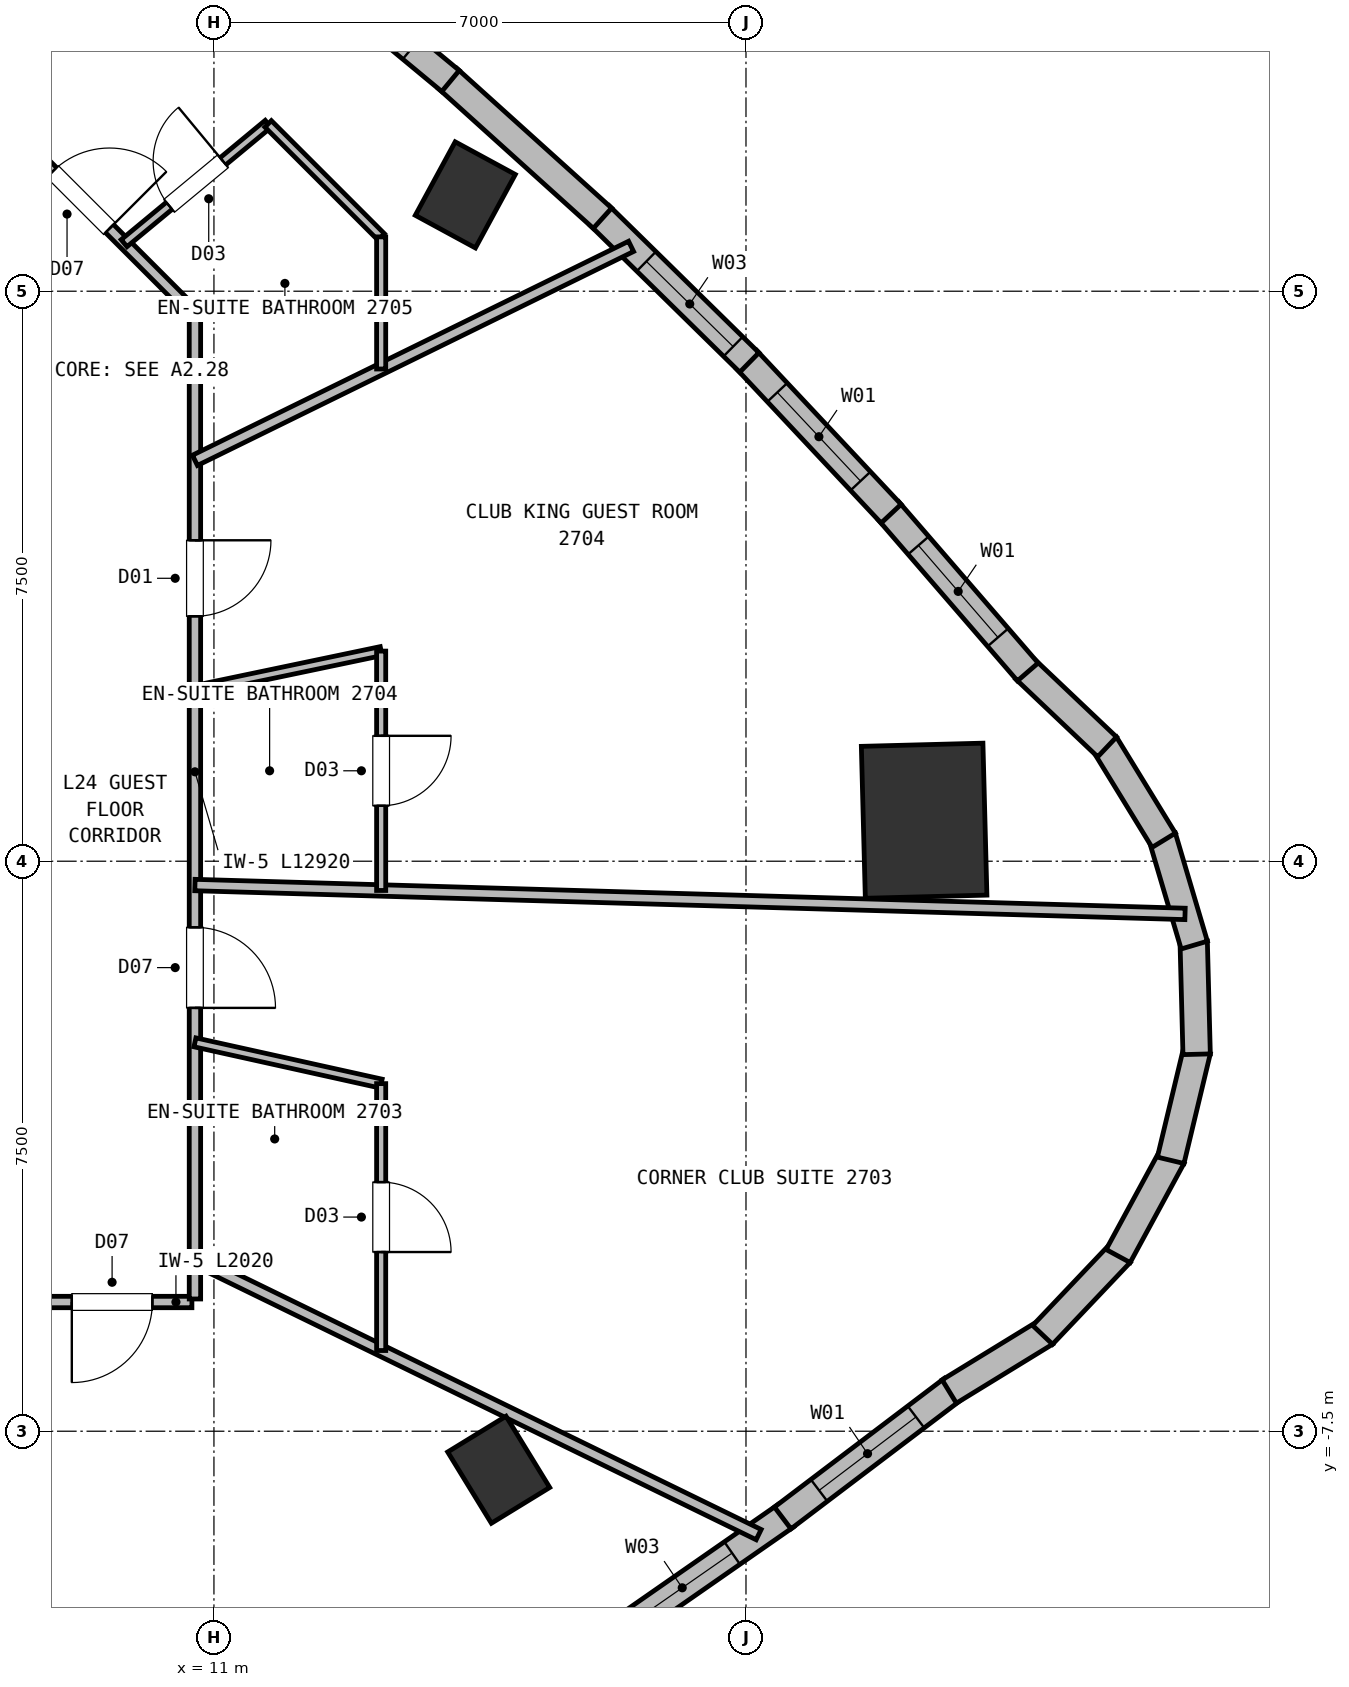
"""IFC4 building model, lengths in metres.
Left out: names, types, materials, properties, quantities, classifications, styles, units other than length and angle.
Written with IfcOpenShell. Run it as: python <this file> out.ifc"""

import sys

from ifc_helpers import new_model, si_unit, direction, frame, frame_2d, origin, origin_2d, place, context, subcontext, project, spatial, rectangle, extrude, element, fill, save


model = new_model("IFC4")
c1 = context("Model", 3, precision=1e-05, world=origin(), true_north=direction((0.0, 1.0)))
c2 = subcontext(c1, "Body", "Model", "MODEL_VIEW")
j1 = project(units=[si_unit("LENGTHUNIT", "METRE"), si_unit("PLANEANGLEUNIT", "RADIAN")], contexts=[c1])
p1 = place(None, origin())
s1 = spatial("IfcSite", under=j1, at=p1, CompositionType="ELEMENT")
p2 = place(p1, origin())
s2 = spatial("IfcBuilding", under=s1, at=p2, CompositionType="ELEMENT")
p3 = place(p2, frame((0.0, 0.0, 101.0)))
s3 = spatial("IfcBuildingStorey", under=s2, at=p3, CompositionType="ELEMENT", Elevation=101.0)
p4 = place(p3, frame((14.747, -8.007, 0.0), z_axis=(0.0, 0.0, 1.0), x_axis=(0.852640164354, 0.522498564716, 0.0)))
e1 = element("IfcColumn", 1, at=p4, inside=s3, PredefinedType="COLUMN", context=c2, shape_type="SweptSolid", body=[
    extrude(rectangle(XDim=0.9, YDim=1.1, at=origin_2d()), origin(), (0.0, 0.0, 1.0), 3.75),
])
p5 = place(p3, frame((20.344, 0.533, 0.0), z_axis=(0.0, 0.0, 1.0), x_axis=(0.999657324976, 0.026176948308, 0.0)))
e2 = element("IfcColumn", 2, at=p5, inside=s3, PredefinedType="COLUMN", context=c2, shape_type="SweptSolid", body=[
    extrude(rectangle(XDim=1.6, YDim=2.0, at=origin_2d()), origin(), (0.0, 0.0, 1.0), 3.75),
])
p6 = place(p3, frame((14.307, 8.767, 0.0), z_axis=(0.0, 0.0, 1.0), x_axis=(-0.878817112662, 0.47715876026, 0.0)))
e3 = element("IfcColumn", 3, at=p6, inside=s3, PredefinedType="COLUMN", context=c2, shape_type="SweptSolid", body=[
    extrude(rectangle(XDim=0.9, YDim=1.1, at=origin_2d()), origin(), (0.0, 0.0, 1.0), 3.75),
])
p7 = place(p3, frame((18.524, -8.612, 0.0), z_axis=(0.0, 0.0, 1.0), x_axis=(-0.820851453433, -0.5711417437, 0.0)))
e4 = element("IfcWall", 4, at=p7, inside=s3, PredefinedType="SOLIDWALL", context=c2, shape_type="SweptSolid", body=[
    extrude(rectangle(XDim=2.778, YDim=0.36, at=frame_2d((1.389, 0.0))), origin(), (0.0, 0.0, 1.0), 3.5),
])
p8 = place(p7, frame((0.86, 0.0, 0.72)))
e5 = element("IfcOpeningElement", 5, at=p8, cuts=e4, PredefinedType="OPENING", context=c2, shape_type="SweptSolid", body=[
    extrude(rectangle(XDim=1.6, YDim=1.88, at=frame_2d((0.8, 0.94))), frame((0.0, 0.19, 0.0), z_axis=(0.0, -1.0, 0.0), x_axis=(1.0, 0.0, 0.0)), (0.0, 0.0, 1.0), 0.38),
])
p9 = place(p3, frame((20.716, -6.949, 0.0), z_axis=(0.0, 0.0, 1.0), x_axis=(-0.796935762967, -0.604064060928, 0.0)))
e6 = element("IfcWall", 6, at=p9, inside=s3, PredefinedType="SOLIDWALL", context=c2, shape_type="SweptSolid", body=[
    extrude(rectangle(XDim=2.801, YDim=0.36, at=frame_2d((1.401, 0.0))), origin(), (0.0, 0.0, 1.0), 3.5),
])
p10 = place(p9, frame((0.601, 0.0, 0.72)))
e7 = element("IfcOpeningElement", 7, at=p10, cuts=e6, PredefinedType="OPENING", context=c2, shape_type="SweptSolid", body=[
    extrude(rectangle(XDim=1.6, YDim=1.88, at=frame_2d((0.8, 0.94))), frame((0.0, 0.19, 0.0), z_axis=(0.0, -1.0, 0.0), x_axis=(1.0, 0.0, 0.0)), (0.0, 0.0, 1.0), 0.38),
])
for number, where, z_axis, x_axis in (
    (8, (21.941, -6.201, 0.0), (0.0, 0.0, 1.0), (-0.853, -0.523, 0.0)),
    (9, (22.926, -5.155, 0.0), (0.0, 0.0, 1.0), (-0.688, -0.725, 0.0)),
):
    element("IfcWall", number, at=place(p3, frame(where, z_axis=z_axis, x_axis=x_axis)), inside=s3, PredefinedType="SOLIDWALL", context=c2, shape_type="SweptSolid", body=[
        extrude(rectangle(XDim=1.486, YDim=0.36, at=frame_2d((0.743, 0.0))), origin(), (0.0, 0.0, 1.0), 3.5),
    ])
for number, where, z_axis, x_axis in (
    (10, (23.605, -3.889, 0.0), (0.0, 0.0, 1.0), (-0.477, -0.879, 0.0)),
    (11, (23.934, -2.491, 0.0), (0.0, 0.0, 1.0), (-0.233, -0.972, 0.0)),
):
    element("IfcWall", number, at=place(p3, frame(where, z_axis=z_axis, x_axis=x_axis)), inside=s3, PredefinedType="SOLIDWALL", context=c2, shape_type="SweptSolid", body=[
        extrude(rectangle(XDim=1.486, YDim=0.36, at=frame_2d((0.743, 0.0))), origin(), (0.0, 0.0, 1.0), 3.5),
    ])
for number, where, z_axis, x_axis in (
    (12, (23.89, -1.055, 0.0), (0.0, 0.0, 1.0), (0.026, -1.0, 0.0)),
    (13, (23.476, 0.321, 0.0), (0.0, 0.0, 1.0), (0.284, -0.959, 0.0)),
    (14, (22.72, 1.542, 0.0), (0.0, 0.0, 1.0), (0.523, -0.853, 0.0)),
    (15, (21.673, 2.527, 0.0), (0.0, 0.0, 1.0), (0.725, -0.688, 0.0)),
):
    element("IfcWall", number, at=place(p3, frame(where, z_axis=z_axis, x_axis=x_axis)), inside=s3, PredefinedType="SOLIDWALL", context=c2, shape_type="SweptSolid", body=[
        extrude(rectangle(XDim=1.486, YDim=0.36, at=frame_2d((0.743, 0.0))), origin(), (0.0, 0.0, 1.0), 3.5),
    ])
p11 = place(p3, frame((19.876, 4.61, 0.0), z_axis=(0.0, 0.0, 1.0), x_axis=(0.653907994708, -0.75657407731, 0.0)))
e16 = element("IfcWall", 16, at=p11, inside=s3, PredefinedType="SOLIDWALL", context=c2, shape_type="SweptSolid", body=[
    extrude(rectangle(XDim=2.801, YDim=0.36, at=frame_2d((1.401, 0.0))), origin(), (0.0, 0.0, 1.0), 3.5),
])
p12 = place(p11, frame((0.601, 0.0, 0.72)))
e17 = element("IfcOpeningElement", 17, at=p12, cuts=e16, PredefinedType="OPENING", context=c2, shape_type="SweptSolid", body=[
    extrude(rectangle(XDim=1.6, YDim=1.88, at=frame_2d((0.8, 0.94))), frame((0.0, 0.19, 0.0), z_axis=(0.0, -1.0, 0.0), x_axis=(1.0, 0.0, 0.0)), (0.0, 0.0, 1.0), 0.38),
])
p13 = place(p3, frame((18.009, 6.598, 0.0), z_axis=(0.0, 0.0, 1.0), x_axis=(0.68415455393, -0.729337059484, 0.0)))
e18 = element("IfcWall", 18, at=p13, inside=s3, PredefinedType="SOLIDWALL", context=c2, shape_type="SweptSolid", body=[
    extrude(rectangle(XDim=2.777, YDim=0.36, at=frame_2d((1.389, 0.0))), origin(), (0.0, 0.0, 1.0), 3.5),
])
p14 = place(p13, frame((0.589, 0.0, 0.72)))
e19 = element("IfcOpeningElement", 19, at=p14, cuts=e18, PredefinedType="OPENING", context=c2, shape_type="SweptSolid", body=[
    extrude(rectangle(XDim=1.6, YDim=1.88, at=frame_2d((0.8, 0.94))), frame((0.0, 0.19, 0.0), z_axis=(0.0, -1.0, 0.0), x_axis=(1.0, 0.0, 0.0)), (0.0, 0.0, 1.0), 0.38),
])
p15 = place(p3, frame((16.075, 8.495, 0.0), z_axis=(0.0, 0.0, 1.0), x_axis=(0.713713584755, -0.70043766242, 0.0)))
e20 = element("IfcWall", 20, at=p15, inside=s3, PredefinedType="SOLIDWALL", context=c2, shape_type="SweptSolid", body=[
    extrude(rectangle(XDim=2.759, YDim=0.36, at=frame_2d((1.379, 0.0))), origin(), (0.0, 0.0, 1.0), 3.5),
])
p16 = place(p15, frame((0.86, 0.0, 0.72)))
e21 = element("IfcOpeningElement", 21, at=p16, cuts=e20, PredefinedType="OPENING", context=c2, shape_type="SweptSolid", body=[
    extrude(rectangle(XDim=1.6, YDim=1.88, at=frame_2d((0.8, 0.94))), frame((0.0, 0.19, 0.0), z_axis=(0.0, -1.0, 0.0), x_axis=(1.0, 0.0, 0.0)), (0.0, 0.0, 1.0), 0.38),
])
p17 = place(p3, frame((14.075, 10.299, 0.0), z_axis=(0.0, 0.0, 1.0), x_axis=(0.742346706701, -0.67001594537, 0.0)))
e22 = element("IfcWall", 22, at=p17, inside=s3, PredefinedType="SOLIDWALL", context=c2, shape_type="SweptSolid", body=[
    extrude(rectangle(XDim=2.744, YDim=0.36, at=frame_2d((1.372, 0.0))), origin(), (0.0, 0.0, 1.0), 3.5),
])
p18 = place(p3, frame((12.007, 12.011, 0.0), z_axis=(0.0, 0.0, 1.0), x_axis=(0.769960149578, -0.63809197461, 0.0)))
e23 = element("IfcWall", 23, at=p18, inside=s3, PredefinedType="SOLIDWALL", context=c2, shape_type="SweptSolid", body=[
    extrude(rectangle(XDim=2.735, YDim=0.36, at=frame_2d((1.367, 0.0))), origin(), (0.0, 0.0, 1.0), 3.5),
])
p19 = place(p18, frame((0.667, 0.0, 0.72)))
e24 = element("IfcOpeningElement", 24, at=p19, cuts=e23, PredefinedType="OPENING", context=c2, shape_type="SweptSolid", body=[
    extrude(rectangle(XDim=1.4, YDim=1.84, at=frame_2d((0.7, 0.92))), frame((0.0, 0.19, 0.0), z_axis=(0.0, -1.0, 0.0), x_axis=(1.0, 0.0, 0.0)), (0.0, 0.0, 1.0), 0.38),
])
p20 = place(p3, frame((10.71, -5.8, 0.0), z_axis=(0.0, 0.0, 1.0), x_axis=(-1.0, 0.0, 0.0)))
e25 = element("IfcWall", 25, at=p20, inside=s3, PredefinedType="PARTITIONING", context=c2, shape_type="SweptSolid", body=[
    extrude(rectangle(XDim=2.02, YDim=0.15, at=frame_2d((1.01, 0.0))), origin(), (0.0, 0.0, 1.0), 3.5),
])
p21 = place(p20, frame((0.52, 0.0, 0.0)))
e26 = element("IfcOpeningElement", 26, at=p21, cuts=e25, PredefinedType="OPENING", context=c2, shape_type="SweptSolid", body=[
    extrude(rectangle(XDim=1.06, YDim=2.15, at=frame_2d((0.53, 1.075))), frame((0.0, 0.085, 0.0), z_axis=(0.0, -1.0, 0.0), x_axis=(1.0, 0.0, 0.0)), (0.0, 0.0, 1.0), 0.17),
])
p22 = place(p3, frame((10.75, 7.16, 0.0), z_axis=(0.0, 0.0, 1.0), x_axis=(0.0, -1.0, 0.0)))
e27 = element("IfcWall", 27, at=p22, inside=s3, PredefinedType="PARTITIONING", context=c2, shape_type="SweptSolid", body=[
    extrude(rectangle(XDim=12.92, YDim=0.15, at=frame_2d((6.46, 0.0))), origin(), (0.0, 0.0, 1.0), 3.5),
])
p23 = place(p22, frame((2.937, 0.0, 0.0)))
e28 = element("IfcOpeningElement", 28, at=p23, cuts=e27, PredefinedType="OPENING", context=c2, shape_type="SweptSolid", body=[
    extrude(rectangle(XDim=1.0, YDim=2.15, at=frame_2d((0.5, 1.075))), frame((0.0, 0.085, 0.0), z_axis=(0.0, -1.0, 0.0), x_axis=(1.0, 0.0, 0.0)), (0.0, 0.0, 1.0), 0.17),
])
p24 = place(p22, frame((8.03, 0.0, 0.0)))
e29 = element("IfcOpeningElement", 29, at=p24, cuts=e27, PredefinedType="OPENING", context=c2, shape_type="SweptSolid", body=[
    extrude(rectangle(XDim=1.06, YDim=2.15, at=frame_2d((0.53, 1.075))), frame((0.0, 0.085, 0.0), z_axis=(0.0, -1.0, 0.0), x_axis=(1.0, 0.0, 0.0)), (0.0, 0.0, 1.0), 0.17),
])
p25 = place(p3, frame((8.678, 9.272, 0.0), z_axis=(0.0, 0.0, 1.0), x_axis=(0.707106781187, -0.707106781187, 0.0)))
e30 = element("IfcWall", 30, at=p25, inside=s3, PredefinedType="PARTITIONING", context=c2, shape_type="SweptSolid", body=[
    extrude(rectangle(XDim=2.89, YDim=0.15, at=frame_2d((1.445, 0.0))), origin(), (0.0, 0.0, 1.0), 3.5),
])
p26 = place(p25, frame((0.28, 0.0, 0.0)))
e31 = element("IfcOpeningElement", 31, at=p26, cuts=e30, PredefinedType="OPENING", context=c2, shape_type="SweptSolid", body=[
    extrude(rectangle(XDim=1.06, YDim=2.15, at=frame_2d((0.53, 1.075))), frame((0.0, 0.085, 0.0), z_axis=(0.0, -1.0, 0.0), x_axis=(1.0, 0.0, 0.0)), (0.0, 0.0, 1.0), 0.17),
])
p27 = place(p3, frame((10.75, -5.243, 0.0), z_axis=(0.0, 0.0, 1.0), x_axis=(0.898792044872, -0.4383752503, 0.0)))
e32 = element("IfcWall", 32, at=p27, inside=s3, PredefinedType="PARTITIONING", context=c2, shape_type="SweptSolid", body=[
    extrude(rectangle(XDim=8.252, YDim=0.15, at=frame_2d((4.126, 0.0))), origin(), (0.0, 0.0, 1.0), 3.5),
])
p28 = place(p3, frame((10.75, -2.383, 0.0), z_axis=(0.0, 0.0, 1.0), x_axis=(0.976289961462, -0.216466882337, 0.0)))
e33 = element("IfcWall", 33, at=p28, inside=s3, PredefinedType="PARTITIONING", context=c2, shape_type="SweptSolid", body=[
    extrude(rectangle(XDim=2.51, YDim=0.12, at=frame_2d((1.255, 0.0))), origin(), (0.0, 0.0, 1.0), 3.5),
])
p29 = place(p3, frame((13.2, -2.927, 0.0), z_axis=(0.0, 0.0, 1.0), x_axis=(0.0, -1.0, 0.0)))
e34 = element("IfcWall", 34, at=p29, inside=s3, PredefinedType="PARTITIONING", context=c2, shape_type="SweptSolid", body=[
    extrude(rectangle(XDim=3.511, YDim=0.12, at=frame_2d((1.756, 0.0))), origin(), (0.0, 0.0, 1.0), 3.5),
])
p30 = place(p29, frame((1.296, 0.0, 0.0)))
e35 = element("IfcOpeningElement", 35, at=p30, cuts=e34, PredefinedType="OPENING", context=c2, shape_type="SweptSolid", body=[
    extrude(rectangle(XDim=0.92, YDim=2.1, at=frame_2d((0.46, 1.05))), frame((0.0, 0.07, 0.0), z_axis=(0.0, -1.0, 0.0), x_axis=(1.0, 0.0, 0.0)), (0.0, 0.0, 1.0), 0.14),
])
p31 = place(p3, frame((10.75, -0.313, 0.0), z_axis=(0.0, 0.0, 1.0), x_axis=(0.999575058165, -0.029149667157, 0.0)))
e36 = element("IfcWall", 36, at=p31, inside=s3, PredefinedType="PARTITIONING", context=c2, shape_type="SweptSolid", body=[
    extrude(rectangle(XDim=13.032, YDim=0.15, at=frame_2d((6.516, 0.0))), origin(), (0.0, 0.0, 1.0), 3.5),
])
p32 = place(p3, frame((13.2, 2.765, 0.0), z_axis=(0.0, 0.0, 1.0), x_axis=(-0.978777888037, -0.204924000276, 0.0)))
e37 = element("IfcWall", 37, at=p32, inside=s3, PredefinedType="PARTITIONING", context=c2, shape_type="SweptSolid", body=[
    extrude(rectangle(XDim=2.503, YDim=0.12, at=frame_2d((1.251, 0.0))), origin(), (0.0, 0.0, 1.0), 3.5),
])
p33 = place(p3, frame((13.2, 2.765, 0.0), z_axis=(0.0, 0.0, 1.0), x_axis=(0.0, -1.0, 0.0)))
e38 = element("IfcWall", 38, at=p33, inside=s3, PredefinedType="PARTITIONING", context=c2, shape_type="SweptSolid", body=[
    extrude(rectangle(XDim=3.15, YDim=0.12, at=frame_2d((1.575, 0.0))), origin(), (0.0, 0.0, 1.0), 3.5),
])
p34 = place(p33, frame((1.115, 0.0, 0.0)))
e39 = element("IfcOpeningElement", 39, at=p34, cuts=e38, PredefinedType="OPENING", context=c2, shape_type="SweptSolid", body=[
    extrude(rectangle(XDim=0.92, YDim=2.1, at=frame_2d((0.46, 1.05))), frame((0.0, 0.07, 0.0), z_axis=(0.0, -1.0, 0.0), x_axis=(1.0, 0.0, 0.0)), (0.0, 0.0, 1.0), 0.14),
])
p35 = place(p3, frame((10.75, 5.274, 0.0), z_axis=(0.0, 0.0, 1.0), x_axis=(0.897755780575, 0.440493539616, 0.0)))
e40 = element("IfcWall", 40, at=p35, inside=s3, PredefinedType="PARTITIONING", context=c2, shape_type="SweptSolid", body=[
    extrude(rectangle(XDim=6.392, YDim=0.15, at=frame_2d((3.196, 0.0))), origin(), (0.0, 0.0, 1.0), 3.5),
])
p36 = place(p3, frame((9.818, 8.132, 0.0), z_axis=(0.0, 0.0, 1.0), x_axis=(0.770088402747, 0.63793718496, 0.0)))
e41 = element("IfcWall", 41, at=p36, inside=s3, PredefinedType="PARTITIONING", context=c2, shape_type="SweptSolid", body=[
    extrude(rectangle(XDim=2.461, YDim=0.12, at=frame_2d((1.23, 0.0))), origin(), (0.0, 0.0, 1.0), 3.5),
])
p37 = place(p36, frame((0.771, 0.0, 0.0)))
e42 = element("IfcOpeningElement", 42, at=p37, cuts=e41, PredefinedType="OPENING", context=c2, shape_type="SweptSolid", body=[
    extrude(rectangle(XDim=0.92, YDim=2.1, at=frame_2d((0.46, 1.05))), frame((0.0, 0.07, 0.0), z_axis=(0.0, -1.0, 0.0), x_axis=(1.0, 0.0, 0.0)), (0.0, 0.0, 1.0), 0.14),
])
p38 = place(p3, frame((11.713, 9.702, 0.0), z_axis=(0.0, 0.0, 1.0), x_axis=(0.707106781187, -0.707106781187, 0.0)))
e43 = element("IfcWall", 43, at=p38, inside=s3, PredefinedType="PARTITIONING", context=c2, shape_type="SweptSolid", body=[
    extrude(rectangle(XDim=2.103, YDim=0.12, at=frame_2d((1.052, 0.0))), origin(), (0.0, 0.0, 1.0), 3.5),
])
p39 = place(p3, frame((13.2, 6.477, 0.0), z_axis=(0.0, 0.0, 1.0), x_axis=(0.0, 1.0, 0.0)))
e44 = element("IfcWall", 44, at=p39, inside=s3, PredefinedType="PARTITIONING", context=c2, shape_type="SweptSolid", body=[
    extrude(rectangle(XDim=1.738, YDim=0.12, at=frame_2d((0.869, 0.0))), origin(), (0.0, 0.0, 1.0), 3.5),
])
p40 = place(p3, frame((7.04, 9.3, 0.0), z_axis=(0.0, 0.0, 1.0), x_axis=(0.603580834167, 0.797301810249, 0.0)))
e45 = element("IfcWall", 45, at=p40, inside=s3, PredefinedType="PARTITIONING", context=c2, shape_type="SweptSolid", body=[
    extrude(rectangle(XDim=5.162, YDim=0.15, at=frame_2d((2.581, 0.0))), origin(), (0.0, 0.0, 1.0), 3.5),
])
p41 = place(p8, origin())
e46 = element("IfcWindow", 46, at=p41, inside=s3, PartitioningType="SINGLE_PANEL", PredefinedType="WINDOW", context=c2, shape_type="SweptSolid", body=[
    extrude(rectangle(XDim=1.6, YDim=1.88, at=frame_2d((0.8, 0.94))), frame((0.0, 0.03, 0.0), z_axis=(0.0, -1.0, 0.0), x_axis=(1.0, 0.0, 0.0)), (0.0, 0.0, 1.0), 0.06),
])
fill(e5, e46)
p42 = place(p10, origin())
e47 = element("IfcWindow", 47, at=p42, inside=s3, PartitioningType="SINGLE_PANEL", PredefinedType="WINDOW", context=c2, shape_type="SweptSolid", body=[
    extrude(rectangle(XDim=1.6, YDim=1.88, at=frame_2d((0.8, 0.94))), frame((0.0, 0.03, 0.0), z_axis=(0.0, -1.0, 0.0), x_axis=(1.0, 0.0, 0.0)), (0.0, 0.0, 1.0), 0.06),
])
fill(e7, e47)
p43 = place(p12, origin())
e48 = element("IfcWindow", 48, at=p43, inside=s3, PartitioningType="SINGLE_PANEL", PredefinedType="WINDOW", context=c2, shape_type="SweptSolid", body=[
    extrude(rectangle(XDim=1.6, YDim=1.88, at=frame_2d((0.8, 0.94))), frame((0.0, 0.03, 0.0), z_axis=(0.0, -1.0, 0.0), x_axis=(1.0, 0.0, 0.0)), (0.0, 0.0, 1.0), 0.06),
])
fill(e17, e48)
p44 = place(p14, origin())
e49 = element("IfcWindow", 49, at=p44, inside=s3, PartitioningType="SINGLE_PANEL", PredefinedType="WINDOW", context=c2, shape_type="SweptSolid", body=[
    extrude(rectangle(XDim=1.6, YDim=1.88, at=frame_2d((0.8, 0.94))), frame((0.0, 0.03, 0.0), z_axis=(0.0, -1.0, 0.0), x_axis=(1.0, 0.0, 0.0)), (0.0, 0.0, 1.0), 0.06),
])
fill(e19, e49)
p45 = place(p16, origin())
e50 = element("IfcWindow", 50, at=p45, inside=s3, PartitioningType="SINGLE_PANEL", PredefinedType="WINDOW", context=c2, shape_type="SweptSolid", body=[
    extrude(rectangle(XDim=1.6, YDim=1.88, at=frame_2d((0.8, 0.94))), frame((0.0, 0.03, 0.0), z_axis=(0.0, -1.0, 0.0), x_axis=(1.0, 0.0, 0.0)), (0.0, 0.0, 1.0), 0.06),
])
fill(e21, e50)
p46 = place(p30, origin())
e51 = element("IfcDoor", 51, at=p46, inside=s3, OperationType="SINGLE_SWING_RIGHT", PredefinedType="DOOR", context=c2, shape_type="SweptSolid", body=[
    extrude(rectangle(XDim=0.92, YDim=2.1, at=frame_2d((0.46, 1.05))), frame((0.0, 0.025, 0.0), z_axis=(0.0, -1.0, 0.0), x_axis=(1.0, 0.0, 0.0)), (0.0, 0.0, 1.0), 0.05),
])
fill(e35, e51)
p47 = place(p34, origin())
e52 = element("IfcDoor", 52, at=p47, inside=s3, OperationType="SINGLE_SWING_LEFT", PredefinedType="DOOR", context=c2, shape_type="SweptSolid", body=[
    extrude(rectangle(XDim=0.92, YDim=2.1, at=frame_2d((0.46, 1.05))), frame((0.0, 0.025, 0.0), z_axis=(0.0, -1.0, 0.0), x_axis=(1.0, 0.0, 0.0)), (0.0, 0.0, 1.0), 0.05),
])
fill(e39, e52)
p48 = place(p37, origin())
e53 = element("IfcDoor", 53, at=p48, inside=s3, OperationType="SINGLE_SWING_RIGHT", PredefinedType="DOOR", context=c2, shape_type="SweptSolid", body=[
    extrude(rectangle(XDim=0.92, YDim=2.1, at=frame_2d((0.46, 1.05))), frame((0.0, 0.025, 0.0), z_axis=(0.0, -1.0, 0.0), x_axis=(1.0, 0.0, 0.0)), (0.0, 0.0, 1.0), 0.05),
])
fill(e42, e53)
p49 = place(p26, origin())
e54 = element("IfcDoor", 54, at=p49, inside=s3, OperationType="SINGLE_SWING_RIGHT", PredefinedType="DOOR", context=c2, shape_type="SweptSolid", body=[
    extrude(rectangle(XDim=1.06, YDim=2.15, at=frame_2d((0.53, 1.075))), frame((0.0, 0.025, 0.0), z_axis=(0.0, -1.0, 0.0), x_axis=(1.0, 0.0, 0.0)), (0.0, 0.0, 1.0), 0.05),
])
fill(e31, e54)
p50 = place(p23, origin())
e55 = element("IfcDoor", 55, at=p50, inside=s3, OperationType="SINGLE_SWING_LEFT", PredefinedType="DOOR", context=c2, shape_type="SweptSolid", body=[
    extrude(rectangle(XDim=1.0, YDim=2.15, at=frame_2d((0.5, 1.075))), frame((0.0, 0.025, 0.0), z_axis=(0.0, -1.0, 0.0), x_axis=(1.0, 0.0, 0.0)), (0.0, 0.0, 1.0), 0.05),
])
fill(e28, e55)
p51 = place(p24, origin())
e56 = element("IfcDoor", 56, at=p51, inside=s3, OperationType="SINGLE_SWING_RIGHT", PredefinedType="DOOR", context=c2, shape_type="SweptSolid", body=[
    extrude(rectangle(XDim=1.06, YDim=2.15, at=frame_2d((0.53, 1.075))), frame((0.0, 0.025, 0.0), z_axis=(0.0, -1.0, 0.0), x_axis=(1.0, 0.0, 0.0)), (0.0, 0.0, 1.0), 0.05),
])
fill(e29, e56)
p52 = place(p21, origin())
e57 = element("IfcDoor", 57, at=p52, inside=s3, OperationType="SINGLE_SWING_RIGHT", PredefinedType="DOOR", context=c2, shape_type="SweptSolid", body=[
    extrude(rectangle(XDim=1.06, YDim=2.15, at=frame_2d((0.53, 1.075))), frame((0.0, 0.025, 0.0), z_axis=(0.0, -1.0, 0.0), x_axis=(1.0, 0.0, 0.0)), (0.0, 0.0, 1.0), 0.05),
])
fill(e26, e57)
save(model, sys.argv[1])
